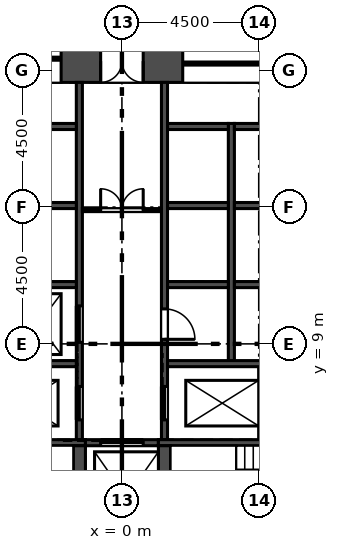
"""IFC4 building model, lengths in metres.
Left out: names, types, materials, properties, quantities, classifications, styles, units other than length and angle.
Written with IfcOpenShell. Run it as: python <this file> out.ifc"""

import sys

from ifc_helpers import new_model, si_unit, direction, frame, frame_2d, origin, place, context, subcontext, project, spatial, rectangle, extrude, element, fill, save


model = new_model("IFC4")
c1 = context("Model", 3, precision=1e-05, world=origin(), true_north=direction((0.0, 1.0)))
c2 = subcontext(c1, "Body", "Model", "MODEL_VIEW")
j1 = project(units=[si_unit("LENGTHUNIT", "METRE"), si_unit("PLANEANGLEUNIT", "RADIAN")], contexts=[c1])
p1 = place(None, origin())
s1 = spatial("IfcSite", under=j1, at=p1, CompositionType="ELEMENT")
p2 = place(p1, origin())
s2 = spatial("IfcBuilding", under=s1, at=p2, CompositionType="ELEMENT")
p3 = place(p2, frame((0.0, 0.0, 25.0)))
s3 = spatial("IfcBuildingStorey", under=s2, at=p3, CompositionType="ELEMENT", Elevation=25.0)
p4 = place(p3, frame((9.412, 18.3, 0.0), z_axis=(0.0, 0.0, 1.0), x_axis=(-1.0, 0.0, 0.0)))
e1 = element("IfcWall", 1, at=p4, inside=s3, PredefinedType="SHEAR", context=c2, shape_type="SweptSolid", body=[
    extrude(rectangle(XDim=18.823, YDim=1.4, at=frame_2d((9.412, 0.0))), origin(), (0.0, 0.0, 1.0), 4.5),
])
p5 = place(p4, frame((8.711, 0.0, 0.0)))
e2 = element("IfcOpeningElement", 2, at=p5, cuts=e1, PredefinedType="OPENING", context=c2, shape_type="SweptSolid", body=[
    extrude(rectangle(XDim=1.4, YDim=2.1, at=frame_2d((0.7, 1.05))), frame((0.0, 0.71, 0.0), z_axis=(0.0, -1.0, 0.0), x_axis=(1.0, 0.0, 0.0)), (0.0, 0.0, 1.0), 1.42),
])
p6 = place(p4, frame((11.412, 0.0, 0.0)))
e3 = element("IfcOpeningElement", 3, at=p6, cuts=e1, PredefinedType="OPENING", context=c2, shape_type="SweptSolid", body=[
    extrude(rectangle(XDim=6.0, YDim=2.4, at=frame_2d((3.0, 1.2))), frame((0.0, 0.71, 0.0), z_axis=(0.0, -1.0, 0.0), x_axis=(1.0, 0.0, 0.0)), (0.0, 0.0, 1.0), 1.42),
])
p7 = place(p4, frame((1.412, 0.0, 0.0)))
e4 = element("IfcOpeningElement", 4, at=p7, cuts=e1, PredefinedType="OPENING", context=c2, shape_type="SweptSolid", body=[
    extrude(rectangle(XDim=6.0, YDim=2.4, at=frame_2d((3.0, 1.2))), frame((0.0, 0.71, 0.0), z_axis=(0.0, -1.0, 0.0), x_axis=(1.0, 0.0, 0.0)), (0.0, 0.0, 1.0), 1.42),
])
p8 = place(p3, frame((32.353, 7.709, 0.0), z_axis=(0.0, 0.0, 1.0), x_axis=(-0.500000836325, 0.866024920931, 0.0)))
e5 = element("IfcWall", 5, at=p8, inside=s3, PredefinedType="SOLIDWALL", context=c2, shape_type="SweptSolid", body=[
    extrude(rectangle(XDim=56.0, YDim=0.34, at=frame_2d((28.0, 0.0))), origin(), (0.0, 0.0, 1.0), 4.2),
])
p9 = place(p8, frame((1.5, 0.0, 0.9)))
e6 = element("IfcOpeningElement", 6, at=p9, cuts=e5, PredefinedType="OPENING", context=c2, shape_type="SweptSolid", body=[
    extrude(rectangle(XDim=1.885, YDim=3.0, at=frame_2d((0.942, 1.5))), frame((0.0, 0.18, 0.0), z_axis=(0.0, -1.0, 0.0), x_axis=(1.0, 0.0, 0.0)), (0.0, 0.0, 1.0), 0.36),
])
p10 = place(p8, frame((4.5, 0.0, 0.9)))
e7 = element("IfcOpeningElement", 7, at=p10, cuts=e5, PredefinedType="OPENING", context=c2, shape_type="SweptSolid", body=[
    extrude(rectangle(XDim=1.885, YDim=3.0, at=frame_2d((0.942, 1.5))), frame((0.0, 0.18, 0.0), z_axis=(0.0, -1.0, 0.0), x_axis=(1.0, 0.0, 0.0)), (0.0, 0.0, 1.0), 0.36),
])
p11 = place(p8, frame((7.5, 0.0, 0.9)))
e8 = element("IfcOpeningElement", 8, at=p11, cuts=e5, PredefinedType="OPENING", context=c2, shape_type="SweptSolid", body=[
    extrude(rectangle(XDim=1.885, YDim=3.0, at=frame_2d((0.942, 1.5))), frame((0.0, 0.18, 0.0), z_axis=(0.0, -1.0, 0.0), x_axis=(1.0, 0.0, 0.0)), (0.0, 0.0, 1.0), 0.36),
])
p12 = place(p8, frame((10.5, 0.0, 0.9)))
e9 = element("IfcOpeningElement", 9, at=p12, cuts=e5, PredefinedType="OPENING", context=c2, shape_type="SweptSolid", body=[
    extrude(rectangle(XDim=1.885, YDim=3.0, at=frame_2d((0.942, 1.5))), frame((0.0, 0.18, 0.0), z_axis=(0.0, -1.0, 0.0), x_axis=(1.0, 0.0, 0.0)), (0.0, 0.0, 1.0), 0.36),
])
p13 = place(p8, frame((13.5, 0.0, 0.9)))
e10 = element("IfcOpeningElement", 10, at=p13, cuts=e5, PredefinedType="OPENING", context=c2, shape_type="SweptSolid", body=[
    extrude(rectangle(XDim=1.885, YDim=3.0, at=frame_2d((0.942, 1.5))), frame((0.0, 0.18, 0.0), z_axis=(0.0, -1.0, 0.0), x_axis=(1.0, 0.0, 0.0)), (0.0, 0.0, 1.0), 0.36),
])
p14 = place(p8, frame((16.5, 0.0, 0.9)))
e11 = element("IfcOpeningElement", 11, at=p14, cuts=e5, PredefinedType="OPENING", context=c2, shape_type="SweptSolid", body=[
    extrude(rectangle(XDim=1.885, YDim=3.0, at=frame_2d((0.942, 1.5))), frame((0.0, 0.18, 0.0), z_axis=(0.0, -1.0, 0.0), x_axis=(1.0, 0.0, 0.0)), (0.0, 0.0, 1.0), 0.36),
])
p15 = place(p8, frame((19.5, 0.0, 0.9)))
e12 = element("IfcOpeningElement", 12, at=p15, cuts=e5, PredefinedType="OPENING", context=c2, shape_type="SweptSolid", body=[
    extrude(rectangle(XDim=1.885, YDim=3.0, at=frame_2d((0.942, 1.5))), frame((0.0, 0.18, 0.0), z_axis=(0.0, -1.0, 0.0), x_axis=(1.0, 0.0, 0.0)), (0.0, 0.0, 1.0), 0.36),
])
p16 = place(p8, frame((22.5, 0.0, 0.9)))
e13 = element("IfcOpeningElement", 13, at=p16, cuts=e5, PredefinedType="OPENING", context=c2, shape_type="SweptSolid", body=[
    extrude(rectangle(XDim=1.885, YDim=3.0, at=frame_2d((0.942, 1.5))), frame((0.0, 0.18, 0.0), z_axis=(0.0, -1.0, 0.0), x_axis=(1.0, 0.0, 0.0)), (0.0, 0.0, 1.0), 0.36),
])
p17 = place(p8, frame((25.5, 0.0, 0.9)))
e14 = element("IfcOpeningElement", 14, at=p17, cuts=e5, PredefinedType="OPENING", context=c2, shape_type="SweptSolid", body=[
    extrude(rectangle(XDim=1.885, YDim=3.0, at=frame_2d((0.942, 1.5))), frame((0.0, 0.18, 0.0), z_axis=(0.0, -1.0, 0.0), x_axis=(1.0, 0.0, 0.0)), (0.0, 0.0, 1.0), 0.36),
])
p18 = place(p8, frame((28.5, 0.0, 0.9)))
e15 = element("IfcOpeningElement", 15, at=p18, cuts=e5, PredefinedType="OPENING", context=c2, shape_type="SweptSolid", body=[
    extrude(rectangle(XDim=1.885, YDim=3.0, at=frame_2d((0.942, 1.5))), frame((0.0, 0.18, 0.0), z_axis=(0.0, -1.0, 0.0), x_axis=(1.0, 0.0, 0.0)), (0.0, 0.0, 1.0), 0.36),
])
p19 = place(p8, frame((31.5, 0.0, 0.0)))
e16 = element("IfcOpeningElement", 16, at=p19, cuts=e5, PredefinedType="OPENING", context=c2, shape_type="SweptSolid", body=[
    extrude(rectangle(XDim=1.885, YDim=2.6, at=frame_2d((0.942, 1.3))), frame((0.0, 0.18, 0.0), z_axis=(0.0, -1.0, 0.0), x_axis=(1.0, 0.0, 0.0)), (0.0, 0.0, 1.0), 0.36),
])
p20 = place(p8, frame((34.5, 0.0, 0.9)))
e17 = element("IfcOpeningElement", 17, at=p20, cuts=e5, PredefinedType="OPENING", context=c2, shape_type="SweptSolid", body=[
    extrude(rectangle(XDim=1.885, YDim=3.0, at=frame_2d((0.942, 1.5))), frame((0.0, 0.18, 0.0), z_axis=(0.0, -1.0, 0.0), x_axis=(1.0, 0.0, 0.0)), (0.0, 0.0, 1.0), 0.36),
])
p21 = place(p8, frame((37.5, 0.0, 0.9)))
e18 = element("IfcOpeningElement", 18, at=p21, cuts=e5, PredefinedType="OPENING", context=c2, shape_type="SweptSolid", body=[
    extrude(rectangle(XDim=1.885, YDim=3.0, at=frame_2d((0.942, 1.5))), frame((0.0, 0.18, 0.0), z_axis=(0.0, -1.0, 0.0), x_axis=(1.0, 0.0, 0.0)), (0.0, 0.0, 1.0), 0.36),
])
p22 = place(p8, frame((40.5, 0.0, 0.9)))
e19 = element("IfcOpeningElement", 19, at=p22, cuts=e5, PredefinedType="OPENING", context=c2, shape_type="SweptSolid", body=[
    extrude(rectangle(XDim=1.885, YDim=3.0, at=frame_2d((0.942, 1.5))), frame((0.0, 0.18, 0.0), z_axis=(0.0, -1.0, 0.0), x_axis=(1.0, 0.0, 0.0)), (0.0, 0.0, 1.0), 0.36),
])
p23 = place(p8, frame((43.5, 0.0, 0.9)))
e20 = element("IfcOpeningElement", 20, at=p23, cuts=e5, PredefinedType="OPENING", context=c2, shape_type="SweptSolid", body=[
    extrude(rectangle(XDim=1.885, YDim=3.0, at=frame_2d((0.942, 1.5))), frame((0.0, 0.18, 0.0), z_axis=(0.0, -1.0, 0.0), x_axis=(1.0, 0.0, 0.0)), (0.0, 0.0, 1.0), 0.36),
])
p24 = place(p8, frame((46.5, 0.0, 0.9)))
e21 = element("IfcOpeningElement", 21, at=p24, cuts=e5, PredefinedType="OPENING", context=c2, shape_type="SweptSolid", body=[
    extrude(rectangle(XDim=1.885, YDim=3.0, at=frame_2d((0.942, 1.5))), frame((0.0, 0.18, 0.0), z_axis=(0.0, -1.0, 0.0), x_axis=(1.0, 0.0, 0.0)), (0.0, 0.0, 1.0), 0.36),
])
p25 = place(p8, frame((49.5, 0.0, 0.9)))
e22 = element("IfcOpeningElement", 22, at=p25, cuts=e5, PredefinedType="OPENING", context=c2, shape_type="SweptSolid", body=[
    extrude(rectangle(XDim=1.885, YDim=3.0, at=frame_2d((0.942, 1.5))), frame((0.0, 0.18, 0.0), z_axis=(0.0, -1.0, 0.0), x_axis=(1.0, 0.0, 0.0)), (0.0, 0.0, 1.0), 0.36),
])
p26 = place(p8, frame((52.5, 0.0, 0.9)))
e23 = element("IfcOpeningElement", 23, at=p26, cuts=e5, PredefinedType="OPENING", context=c2, shape_type="SweptSolid", body=[
    extrude(rectangle(XDim=1.885, YDim=3.0, at=frame_2d((0.942, 1.5))), frame((0.0, 0.18, 0.0), z_axis=(0.0, -1.0, 0.0), x_axis=(1.0, 0.0, 0.0)), (0.0, 0.0, 1.0), 0.36),
])
p27 = place(p3, frame((3.6, 8.45, -2.0), z_axis=(0.0, 0.0, 1.0), x_axis=(0.0, 1.0, 0.0)))
e24 = element("IfcWall", 24, at=p27, inside=s3, PredefinedType="SOLIDWALL", context=c2, shape_type="SweptSolid", body=[
    extrude(rectangle(XDim=7.8, YDim=0.2, at=frame_2d((3.9, 0.0))), origin(), (0.0, 0.0, 1.0), 6.2),
])
p28 = place(p3, frame((-1.4, 5.85, -2.0), z_axis=(0.0, 0.0, 1.0), x_axis=(0.0, 1.0, 0.0)))
e25 = element("IfcWall", 25, at=p28, inside=s3, PredefinedType="SOLIDWALL", context=c2, shape_type="SweptSolid", body=[
    extrude(rectangle(XDim=11.75, YDim=0.2, at=frame_2d((5.875, 0.0))), origin(), (0.0, 0.0, 1.0), 6.2),
])
p29 = place(p28, frame((3.2, 0.0, 2.0)))
e26 = element("IfcOpeningElement", 26, at=p29, cuts=e25, PredefinedType="OPENING", context=c2, shape_type="SweptSolid", body=[
    extrude(rectangle(XDim=1.2, YDim=2.1, at=frame_2d((0.6, 1.05))), frame((0.0, 0.11, 0.0), z_axis=(0.0, -1.0, 0.0), x_axis=(1.0, 0.0, 0.0)), (0.0, 0.0, 1.0), 0.22),
])
p30 = place(p28, frame((0.65, 0.0, 2.0)))
e27 = element("IfcOpeningElement", 27, at=p30, cuts=e25, PredefinedType="OPENING", context=c2, shape_type="SweptSolid", body=[
    extrude(rectangle(XDim=1.1, YDim=2.1, at=frame_2d((0.55, 1.05))), frame((0.0, 0.11, 0.0), z_axis=(0.0, -1.0, 0.0), x_axis=(1.0, 0.0, 0.0)), (0.0, 0.0, 1.0), 0.22),
])
p31 = place(p3, frame((1.4, 5.85, -2.0), z_axis=(0.0, 0.0, 1.0), x_axis=(0.0, 1.0, 0.0)))
e28 = element("IfcWall", 28, at=p31, inside=s3, PredefinedType="SOLIDWALL", context=c2, shape_type="SweptSolid", body=[
    extrude(rectangle(XDim=11.75, YDim=0.2, at=frame_2d((5.875, 0.0))), origin(), (0.0, 0.0, 1.0), 6.2),
])
p32 = place(p31, frame((0.65, 0.0, 2.0)))
e29 = element("IfcOpeningElement", 29, at=p32, cuts=e28, PredefinedType="OPENING", context=c2, shape_type="SweptSolid", body=[
    extrude(rectangle(XDim=1.1, YDim=2.1, at=frame_2d((0.55, 1.05))), frame((0.0, 0.11, 0.0), z_axis=(0.0, -1.0, 0.0), x_axis=(1.0, 0.0, 0.0)), (0.0, 0.0, 1.0), 0.22),
])
p33 = place(p31, frame((3.3, 0.0, 2.0)))
e30 = element("IfcOpeningElement", 30, at=p33, cuts=e28, PredefinedType="OPENING", context=c2, shape_type="SweptSolid", body=[
    extrude(rectangle(XDim=1.0, YDim=2.1, at=frame_2d((0.5, 1.05))), frame((0.0, 0.11, 0.0), z_axis=(0.0, -1.0, 0.0), x_axis=(1.0, 0.0, 0.0)), (0.0, 0.0, 1.0), 0.22),
])
for number, where, z_axis, x_axis in (
    (31, (-5.7, 8.35, -2.0), (0.0, 0.0, 1.0), (1.0, 0.0, 0.0)),
    (32, (1.5, 8.35, -2.0), (0.0, 0.0, 1.0), (1.0, 0.0, 0.0)),
):
    element("IfcWall", number, at=place(p3, frame(where, z_axis=z_axis, x_axis=x_axis)), inside=s3, PredefinedType="SOLIDWALL", context=c2, shape_type="SweptSolid", body=[
        extrude(rectangle(XDim=4.2, YDim=0.2, at=frame_2d((2.1, 0.0))), origin(), (0.0, 0.0, 1.0), 6.2),
    ])
p34 = place(p3, frame((-12.6, 5.75, -2.0), z_axis=(0.0, 0.0, 1.0), x_axis=(1.0, 0.0, 0.0)))
e33 = element("IfcWall", 33, at=p34, inside=s3, PredefinedType="SOLIDWALL", context=c2, shape_type="SweptSolid", body=[
    extrude(rectangle(XDim=11.4, YDim=0.2, at=frame_2d((5.7, 0.0))), origin(), (0.0, 0.0, 1.0), 6.2),
])
p35 = place(p3, frame((-1.2, 5.75, -2.0), z_axis=(0.0, 0.0, 1.0), x_axis=(1.0, 0.0, 0.0)))
e34 = element("IfcWall", 34, at=p35, inside=s3, PredefinedType="SOLIDWALL", context=c2, shape_type="SweptSolid", body=[
    extrude(rectangle(XDim=2.4, YDim=0.2, at=frame_2d((1.2, 0.0))), origin(), (0.0, 0.0, 1.0), 6.2),
])
p36 = place(p35, frame((0.5, 0.0, 2.0)))
e35 = element("IfcOpeningElement", 35, at=p36, cuts=e34, PredefinedType="OPENING", context=c2, shape_type="SweptSolid", body=[
    extrude(rectangle(XDim=1.4, YDim=2.1, at=frame_2d((0.7, 1.05))), frame((0.0, 0.11, 0.0), z_axis=(0.0, -1.0, 0.0), x_axis=(1.0, 0.0, 0.0)), (0.0, 0.0, 1.0), 0.22),
])
p37 = place(p3, frame((1.2, 5.75, -2.0), z_axis=(0.0, 0.0, 1.0), x_axis=(1.0, 0.0, 0.0)))
e36 = element("IfcWall", 36, at=p37, inside=s3, PredefinedType="SOLIDWALL", context=c2, shape_type="SweptSolid", body=[
    extrude(rectangle(XDim=11.4, YDim=0.2, at=frame_2d((5.7, 0.0))), origin(), (0.0, 0.0, 1.0), 6.2),
])
for number, where, z_axis, x_axis in (
    (37, (-1.4, 2.25, -2.0), (0.0, 0.0, 1.0), (0.0, 1.0, 0.0)),
    (38, (1.4, 2.25, -2.0), (0.0, 0.0, 1.0), (0.0, 1.0, 0.0)),
):
    element("IfcWall", number, at=place(p3, frame(where, z_axis=z_axis, x_axis=x_axis)), inside=s3, PredefinedType="SOLIDWALL", context=c2, shape_type="SweptSolid", body=[
        extrude(rectangle(XDim=3.4, YDim=0.4, at=frame_2d((1.7, 0.0))), origin(), (0.0, 0.0, 1.0), 6.2),
    ])
for number, where, z_axis, x_axis in (
    (39, (-3.5, 10.95, -2.0), (0.0, 0.0, 1.0), (1.0, 0.0, 0.0)),
    (40, (-3.5, 13.55, -2.0), (0.0, 0.0, 1.0), (1.0, 0.0, 0.0)),
    (41, (-3.5, 16.15, -2.0), (0.0, 0.0, 1.0), (1.0, 0.0, 0.0)),
    (42, (3.7, 10.95, -2.0), (0.0, 0.0, 1.0), (1.0, 0.0, 0.0)),
    (43, (3.7, 13.55, -2.0), (0.0, 0.0, 1.0), (1.0, 0.0, 0.0)),
    (44, (3.7, 16.15, -2.0), (0.0, 0.0, 1.0), (1.0, 0.0, 0.0)),
    (45, (1.5, 10.95, -2.0), (0.0, 0.0, 1.0), (1.0, 0.0, 0.0)),
    (46, (1.5, 13.55, -2.0), (0.0, 0.0, 1.0), (1.0, 0.0, 0.0)),
    (47, (1.5, 16.15, -2.0), (0.0, 0.0, 1.0), (1.0, 0.0, 0.0)),
):
    element("IfcWall", number, at=place(p3, frame(where, z_axis=z_axis, x_axis=x_axis)), inside=s3, PredefinedType="SOLIDWALL", context=c2, shape_type="SweptSolid", body=[
        extrude(rectangle(XDim=2.0, YDim=0.2, at=frame_2d((1.0, 0.0))), origin(), (0.0, 0.0, 1.0), 6.2),
    ])
p38 = place(p3, frame((-1.3, 13.4, 0.0), z_axis=(0.0, 0.0, 1.0), x_axis=(1.0, 0.0, 0.0)))
e48 = element("IfcWall", 48, at=p38, inside=s3, PredefinedType="PARTITIONING", context=c2, shape_type="SweptSolid", body=[
    extrude(rectangle(XDim=2.6, YDim=0.1, at=frame_2d((1.3, 0.0))), origin(), (0.0, 0.0, 1.0), 4.2),
])
p39 = place(p38, frame((0.6, 0.0, 0.0)))
e49 = element("IfcOpeningElement", 49, at=p39, cuts=e48, PredefinedType="OPENING", context=c2, shape_type="SweptSolid", body=[
    extrude(rectangle(XDim=1.4, YDim=2.1, at=frame_2d((0.7, 1.05))), frame((0.0, 0.06, 0.0), z_axis=(0.0, -1.0, 0.0), x_axis=(1.0, 0.0, 0.0)), (0.0, 0.0, 1.0), 0.12),
])
p40 = place(p29, origin())
e50 = element("IfcDoor", 50, at=p40, inside=s3, OperationType="SLIDING_TO_LEFT", PredefinedType="DOOR", context=c2, shape_type="SweptSolid", body=[
    extrude(rectangle(XDim=1.2, YDim=2.1, at=frame_2d((0.6, 1.05))), frame((0.0, 0.025, 0.0), z_axis=(0.0, -1.0, 0.0), x_axis=(1.0, 0.0, 0.0)), (0.0, 0.0, 1.0), 0.05),
])
fill(e26, e50)
p41 = place(p30, origin())
e51 = element("IfcDoor", 51, at=p41, inside=s3, OperationType="SLIDING_TO_RIGHT", PredefinedType="DOOR", context=c2, shape_type="SweptSolid", body=[
    extrude(rectangle(XDim=1.1, YDim=2.1, at=frame_2d((0.55, 1.05))), frame((0.0, 0.025, 0.0), z_axis=(0.0, -1.0, 0.0), x_axis=(1.0, 0.0, 0.0)), (0.0, 0.0, 1.0), 0.05),
])
fill(e27, e51)
p42 = place(p32, origin())
e52 = element("IfcDoor", 52, at=p42, inside=s3, OperationType="SLIDING_TO_RIGHT", PredefinedType="DOOR", context=c2, shape_type="SweptSolid", body=[
    extrude(rectangle(XDim=1.1, YDim=2.1, at=frame_2d((0.55, 1.05))), frame((0.0, 0.025, 0.0), z_axis=(0.0, -1.0, 0.0), x_axis=(1.0, 0.0, 0.0)), (0.0, 0.0, 1.0), 0.05),
])
fill(e29, e52)
p43 = place(p36, origin())
e53 = element("IfcDoor", 53, at=p43, inside=s3, OperationType="SLIDING_TO_LEFT", PredefinedType="DOOR", context=c2, shape_type="SweptSolid", body=[
    extrude(rectangle(XDim=1.4, YDim=2.1, at=frame_2d((0.7, 1.05))), frame((0.0, 0.025, 0.0), z_axis=(0.0, -1.0, 0.0), x_axis=(1.0, 0.0, 0.0)), (0.0, 0.0, 1.0), 0.05),
])
fill(e35, e53)
p44 = place(p33, frame((1.0, 0.0, 0.0), z_axis=(0.0, 0.0, 1.0), x_axis=(-1.0, 0.0, 0.0)))
e54 = element("IfcDoor", 54, at=p44, inside=s3, OperationType="SINGLE_SWING_RIGHT", PredefinedType="DOOR", context=c2, shape_type="SweptSolid", body=[
    extrude(rectangle(XDim=1.0, YDim=2.1, at=frame_2d((0.5, 1.05))), frame((0.0, 0.025, 0.0), z_axis=(0.0, -1.0, 0.0), x_axis=(1.0, 0.0, 0.0)), (0.0, 0.0, 1.0), 0.05),
])
fill(e30, e54)
p45 = place(p39, origin())
e55 = element("IfcDoor", 55, at=p45, inside=s3, OperationType="DOUBLE_DOOR_SINGLE_SWING", PredefinedType="DOOR", context=c2, shape_type="SweptSolid", body=[
    extrude(rectangle(XDim=1.4, YDim=2.1, at=frame_2d((0.7, 1.05))), frame((0.0, 0.025, 0.0), z_axis=(0.0, -1.0, 0.0), x_axis=(1.0, 0.0, 0.0)), (0.0, 0.0, 1.0), 0.05),
])
fill(e49, e55)
p46 = place(p5, origin())
e56 = element("IfcDoor", 56, at=p46, inside=s3, OperationType="DOUBLE_DOOR_SINGLE_SWING", PredefinedType="DOOR", context=c2, shape_type="SweptSolid", body=[
    extrude(rectangle(XDim=1.4, YDim=2.1, at=frame_2d((0.7, 1.05))), frame((0.0, 0.025, 0.0), z_axis=(0.0, -1.0, 0.0), x_axis=(1.0, 0.0, 0.0)), (0.0, 0.0, 1.0), 0.05),
])
fill(e2, e56)
p47 = place(p6, origin())
e57 = element("IfcDoor", 57, at=p47, inside=s3, OperationType="DOUBLE_DOOR_SLIDING", PredefinedType="DOOR", context=c2, shape_type="SweptSolid", body=[
    extrude(rectangle(XDim=6.0, YDim=2.4, at=frame_2d((3.0, 1.2))), frame((0.0, 0.025, 0.0), z_axis=(0.0, -1.0, 0.0), x_axis=(1.0, 0.0, 0.0)), (0.0, 0.0, 1.0), 0.05),
])
fill(e3, e57)
p48 = place(p7, origin())
e58 = element("IfcDoor", 58, at=p48, inside=s3, OperationType="DOUBLE_DOOR_SLIDING", PredefinedType="DOOR", context=c2, shape_type="SweptSolid", body=[
    extrude(rectangle(XDim=6.0, YDim=2.4, at=frame_2d((3.0, 1.2))), frame((0.0, 0.025, 0.0), z_axis=(0.0, -1.0, 0.0), x_axis=(1.0, 0.0, 0.0)), (0.0, 0.0, 1.0), 0.05),
])
fill(e4, e58)
save(model, sys.argv[1])
